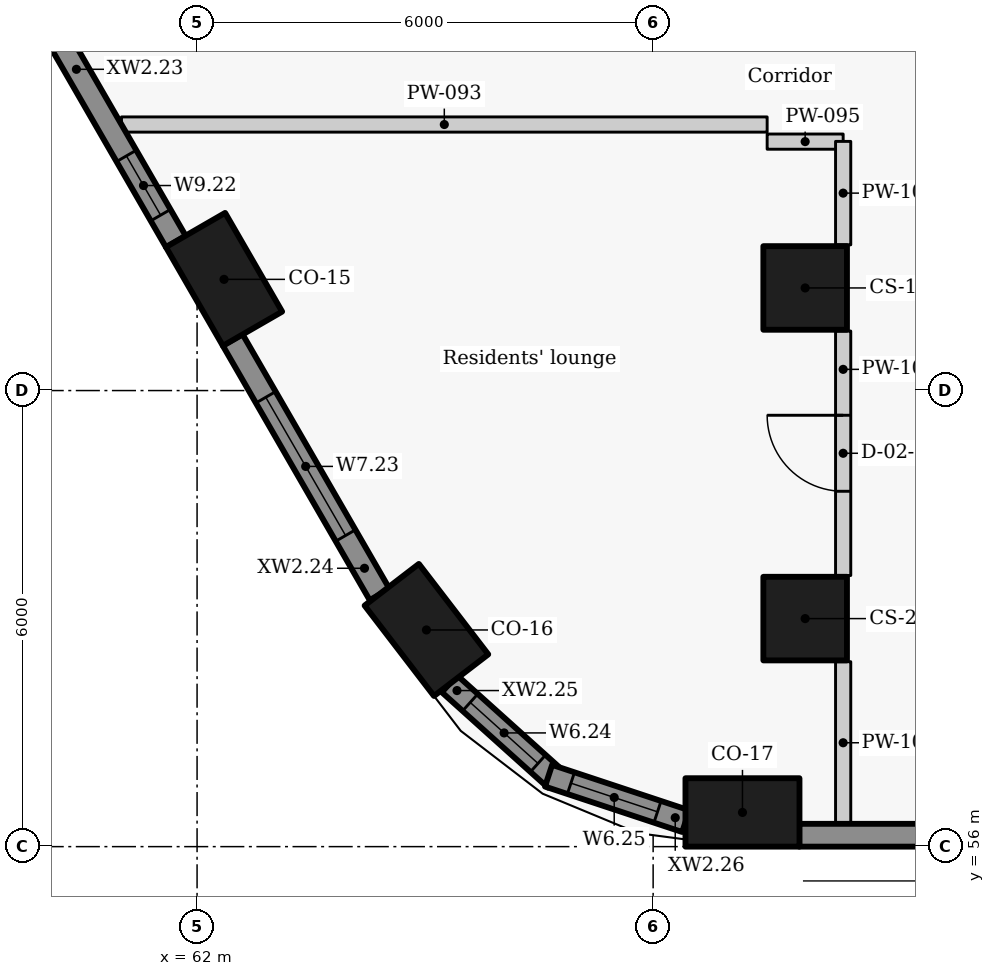
"""IFC4 building model, lengths in metres.
Left out: names, types, materials, properties, quantities, classifications, styles, units other than length and angle.
Written with IfcOpenShell. Run it as: python <this file> out.ifc"""

import sys

from ifc_helpers import new_model, si_unit, direction, frame, frame_2d, origin, origin_2d, place, context, subcontext, project, spatial, rectangle, extrude, element, fill, save


model = new_model("IFC4")
c1 = context("Model", 3, precision=1e-05, world=origin(), true_north=direction((0.0, 1.0)))
c2 = subcontext(c1, "Body", "Model", "MODEL_VIEW")
j1 = project(units=[si_unit("LENGTHUNIT", "METRE"), si_unit("PLANEANGLEUNIT", "RADIAN")], contexts=[c1])
p1 = place(None, origin())
s1 = spatial("IfcSite", under=j1, at=p1, CompositionType="ELEMENT")
p2 = place(p1, origin())
s2 = spatial("IfcBuilding", under=s1, at=p2, CompositionType="ELEMENT")
p3 = place(p2, frame((0.0, 0.0, 44.7)))
s3 = spatial("IfcBuildingStorey", under=s2, at=p3, CompositionType="ELEMENT", Elevation=44.7)
for number, where, z_axis, x_axis in (
    (1, (62.354, 63.463, 0.0), (0.0, 0.0, 1.0), (0.5, -0.866, 0.0)),
    (2, (65.018, 58.851, 0.0), (0.0, 0.0, 1.0), (0.609, -0.793, 0.0)),
    (3, (69.175, 56.45, 0.0), (0.0, 0.0, 1.0), (1.0, 0.0, 0.0)),
):
    element("IfcColumn", number, at=place(p3, frame(where, z_axis=z_axis, x_axis=x_axis)), inside=s3, PredefinedType="COLUMN", context=c2, shape_type="SweptSolid", body=[
        extrude(rectangle(XDim=1.5, YDim=0.9, at=origin_2d()), origin(), (0.0, 0.0, 1.0), 3.3),
    ])
for number, where, z_axis, x_axis in (
    (4, (70.0, 63.35, 0.0), (0.0, 0.0, 1.0), (0.0, -1.0, 0.0)),
    (5, (70.0, 59.0, 0.0), (0.0, 0.0, 1.0), (0.0, -1.0, 0.0)),
):
    element("IfcColumn", number, at=place(p3, frame(where, z_axis=z_axis, x_axis=x_axis)), inside=s3, PredefinedType="COLUMN", context=c2, shape_type="SweptSolid", body=[
        extrude(rectangle(XDim=1.1, YDim=1.1, at=origin_2d()), origin(), (0.0, 0.0, 1.0), 3.3),
    ])
p4 = place(p3, frame((59.805, 67.279, 0.0), z_axis=(0.0, 0.0, 1.0), x_axis=(0.500001735503, -0.866024401789, 0.0)))
e6 = element("IfcWall", 6, at=p4, inside=s3, PredefinedType="SOLIDWALL", context=c2, shape_type="SweptSolid", body=[
    extrude(rectangle(XDim=3.834, YDim=0.3, at=frame_2d((1.917, 0.0))), origin(), (0.0, 0.0, 1.0), 2.425),
])
p5 = place(p4, frame((2.531, 0.0, 0.9)))
e7 = element("IfcOpeningElement", 7, at=p5, cuts=e6, PredefinedType="OPENING", context=c2, shape_type="SweptSolid", body=[
    extrude(rectangle(XDim=0.9, YDim=1.1, at=frame_2d((0.45, 0.55))), frame((0.0, 0.16, 0.0), z_axis=(0.0, -1.0, 0.0), x_axis=(1.0, 0.0, 0.0)), (0.0, 0.0, 1.0), 0.32),
])
p6 = place(p3, frame((62.468, 62.667, 0.0), z_axis=(0.0, 0.0, 1.0), x_axis=(0.499948341072, -0.866055227026, 0.0)))
e8 = element("IfcWall", 8, at=p6, inside=s3, PredefinedType="SOLIDWALL", context=c2, shape_type="SweptSolid", body=[
    extrude(rectangle(XDim=3.867, YDim=0.3, at=frame_2d((1.934, 0.0))), origin(), (0.0, 0.0, 1.0), 2.425),
])
p7 = place(p6, frame((0.872, 0.0, 0.9)))
e9 = element("IfcOpeningElement", 9, at=p7, cuts=e8, PredefinedType="OPENING", context=c2, shape_type="SweptSolid", body=[
    extrude(rectangle(XDim=2.1, YDim=1.1, at=frame_2d((1.05, 0.55))), frame((0.0, 0.16, 0.0), z_axis=(0.0, -1.0, 0.0), x_axis=(1.0, 0.0, 0.0)), (0.0, 0.0, 1.0), 0.32),
])
p8 = place(p3, frame((65.32, 58.143, 0.0), z_axis=(0.0, 0.0, 1.0), x_axis=(0.7435526378, -0.668677407141, 0.0)))
e10 = element("IfcWall", 10, at=p8, inside=s3, PredefinedType="SOLIDWALL", context=c2, shape_type="SweptSolid", body=[
    extrude(rectangle(XDim=1.878, YDim=0.3, at=frame_2d((0.939, 0.0))), origin(), (0.0, 0.0, 1.0), 2.425),
])
p9 = place(p8, frame((0.367, 0.0, 0.9)))
e11 = element("IfcOpeningElement", 11, at=p9, cuts=e10, PredefinedType="OPENING", context=c2, shape_type="SweptSolid", body=[
    extrude(rectangle(XDim=1.2, YDim=1.1, at=frame_2d((0.6, 0.55))), frame((0.0, 0.16, 0.0), z_axis=(0.0, -1.0, 0.0), x_axis=(1.0, 0.0, 0.0)), (0.0, 0.0, 1.0), 0.32),
])
p10 = place(p3, frame((66.624, 56.933, 0.0), z_axis=(0.0, 0.0, 1.0), x_axis=(0.949246659442, -0.314532636683, 0.0)))
e12 = element("IfcWall", 12, at=p10, inside=s3, PredefinedType="SOLIDWALL", context=c2, shape_type="SweptSolid", body=[
    extrude(rectangle(XDim=1.902, YDim=0.3, at=frame_2d((0.951, 0.0))), origin(), (0.0, 0.0, 1.0), 2.425),
])
p11 = place(p10, frame((0.31, 0.0, 0.9)))
e13 = element("IfcOpeningElement", 13, at=p11, cuts=e12, PredefinedType="OPENING", context=c2, shape_type="SweptSolid", body=[
    extrude(rectangle(XDim=1.2, YDim=1.1, at=frame_2d((0.6, 0.55))), frame((0.0, 0.16, 0.0), z_axis=(0.0, -1.0, 0.0), x_axis=(1.0, 0.0, 0.0)), (0.0, 0.0, 1.0), 0.32),
])
p12 = place(p3, frame((69.921, 56.15, 0.0), z_axis=(0.0, 0.0, 1.0), x_axis=(1.0, 0.0, 0.0)))
e14 = element("IfcWall", 14, at=p12, inside=s3, PredefinedType="SOLIDWALL", context=c2, shape_type="SweptSolid", body=[
    extrude(rectangle(XDim=19.84, YDim=0.3, at=frame_2d((9.92, 0.0))), origin(), (0.0, 0.0, 1.0), 2.425),
])
p13 = place(p3, frame((61.005, 65.5, 0.0), z_axis=(0.0, 0.0, 1.0), x_axis=(1.0, 0.0, 0.0)))
e15 = element("IfcWall", 15, at=p13, inside=s3, PredefinedType="PARTITIONING", context=c2, shape_type="SweptSolid", body=[
    extrude(rectangle(XDim=8.495, YDim=0.2, at=frame_2d((4.248, 0.0))), origin(), (0.0, 0.0, 1.0), 2.405),
])
p14 = place(p3, frame((69.5, 65.275, 0.0), z_axis=(0.0, 0.0, 1.0), x_axis=(1.0, 0.0, 0.0)))
e16 = element("IfcWall", 16, at=p14, inside=s3, PredefinedType="PARTITIONING", context=c2, shape_type="SweptSolid", body=[
    extrude(rectangle(XDim=1.0, YDim=0.2, at=frame_2d((0.5, 0.0))), origin(), (0.0, 0.0, 1.0), 2.505),
])
p15 = place(p3, frame((70.5, 56.3, 0.0), z_axis=(0.0, 0.0, 1.0), x_axis=(0.0, 1.0, 0.0)))
e17 = element("IfcWall", 17, at=p15, inside=s3, PredefinedType="PARTITIONING", context=c2, shape_type="SweptSolid", body=[
    extrude(rectangle(XDim=2.133, YDim=0.2, at=frame_2d((1.066, 0.0))), origin(), (0.0, 0.0, 1.0), 3.025),
])
p16 = place(p3, frame((70.5, 59.567, 0.0), z_axis=(0.0, 0.0, 1.0), x_axis=(0.0, 1.0, 0.0)))
e18 = element("IfcWall", 18, at=p16, inside=s3, PredefinedType="PARTITIONING", context=c2, shape_type="SweptSolid", body=[
    extrude(rectangle(XDim=3.216, YDim=0.2, at=frame_2d((1.608, 0.0))), origin(), (0.0, 0.0, 1.0), 3.025),
])
p17 = place(p16, frame((1.108, 0.0, 0.0)))
e19 = element("IfcOpeningElement", 19, at=p17, cuts=e18, PredefinedType="OPENING", context=c2, shape_type="SweptSolid", body=[
    extrude(rectangle(XDim=1.0, YDim=2.1, at=frame_2d((0.5, 1.05))), frame((0.0, 0.11, 0.0), z_axis=(0.0, -1.0, 0.0), x_axis=(1.0, 0.0, 0.0)), (0.0, 0.0, 1.0), 0.22),
])
p18 = place(p3, frame((70.5, 63.917, 0.0), z_axis=(0.0, 0.0, 1.0), x_axis=(0.0, 1.0, 0.0)))
e20 = element("IfcWall", 20, at=p18, inside=s3, PredefinedType="PARTITIONING", context=c2, shape_type="SweptSolid", body=[
    extrude(rectangle(XDim=1.361, YDim=0.2, at=frame_2d((0.681, 0.0))), origin(), (0.0, 0.0, 1.0), 3.025),
])
p19 = place(p5, origin())
e21 = element("IfcWindow", 21, at=p19, inside=s3, PartitioningType="SINGLE_PANEL", PredefinedType="WINDOW", context=c2, shape_type="SweptSolid", body=[
    extrude(rectangle(XDim=0.9, YDim=1.1, at=frame_2d((0.45, 0.55))), frame((0.0, 0.03, 0.0), z_axis=(0.0, -1.0, 0.0), x_axis=(1.0, 0.0, 0.0)), (0.0, 0.0, 1.0), 0.06),
])
fill(e7, e21)
p20 = place(p7, origin())
e22 = element("IfcWindow", 22, at=p20, inside=s3, PartitioningType="SINGLE_PANEL", PredefinedType="WINDOW", context=c2, shape_type="SweptSolid", body=[
    extrude(rectangle(XDim=2.1, YDim=1.1, at=frame_2d((1.05, 0.55))), frame((0.0, 0.03, 0.0), z_axis=(0.0, -1.0, 0.0), x_axis=(1.0, 0.0, 0.0)), (0.0, 0.0, 1.0), 0.06),
])
fill(e9, e22)
p21 = place(p9, origin())
e23 = element("IfcWindow", 23, at=p21, inside=s3, PartitioningType="SINGLE_PANEL", PredefinedType="WINDOW", context=c2, shape_type="SweptSolid", body=[
    extrude(rectangle(XDim=1.2, YDim=1.1, at=frame_2d((0.6, 0.55))), frame((0.0, 0.03, 0.0), z_axis=(0.0, -1.0, 0.0), x_axis=(1.0, 0.0, 0.0)), (0.0, 0.0, 1.0), 0.06),
])
fill(e11, e23)
p22 = place(p11, origin())
e24 = element("IfcWindow", 24, at=p22, inside=s3, PartitioningType="SINGLE_PANEL", PredefinedType="WINDOW", context=c2, shape_type="SweptSolid", body=[
    extrude(rectangle(XDim=1.2, YDim=1.1, at=frame_2d((0.6, 0.55))), frame((0.0, 0.03, 0.0), z_axis=(0.0, -1.0, 0.0), x_axis=(1.0, 0.0, 0.0)), (0.0, 0.0, 1.0), 0.06),
])
fill(e13, e24)
p23 = place(p17, origin())
e25 = element("IfcDoor", 25, at=p23, inside=s3, OperationType="SINGLE_SWING_RIGHT", PredefinedType="DOOR", context=c2, shape_type="SweptSolid", body=[
    extrude(rectangle(XDim=1.0, YDim=2.1, at=frame_2d((0.5, 1.05))), frame((0.0, 0.025, 0.0), z_axis=(0.0, -1.0, 0.0), x_axis=(1.0, 0.0, 0.0)), (0.0, 0.0, 1.0), 0.05),
])
fill(e19, e25)
save(model, sys.argv[1])
